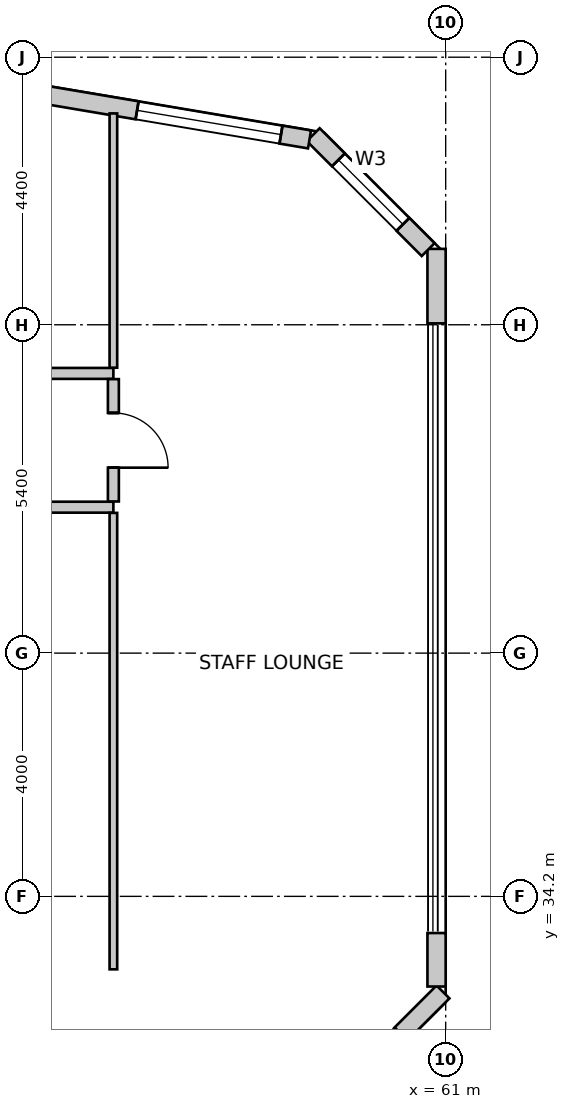
"""IFC4 building model, lengths in metres.
Left out: names, types, materials, properties, quantities, classifications, styles, units other than length and angle.
Written with IfcOpenShell. Run it as: python <this file> out.ifc"""

import sys

from ifc_helpers import new_model, si_unit, direction, frame, frame_2d, origin, place, context, subcontext, project, spatial, rectangle, extrude, source, transform, mapped, element, fill, save


model = new_model("IFC4")
c1 = context("Model", 3, precision=1e-05, world=origin(), true_north=direction((0.0, 1.0)))
c2 = subcontext(c1, "Body", "Model", "MODEL_VIEW")
j1 = project(units=[si_unit("LENGTHUNIT", "METRE"), si_unit("PLANEANGLEUNIT", "RADIAN")], contexts=[c1])
p1 = place(None, origin())
s1 = spatial("IfcSite", under=j1, at=p1, CompositionType="ELEMENT")
p2 = place(p1, origin())
s2 = spatial("IfcBuilding", under=s1, at=p2, CompositionType="ELEMENT")
p3 = place(p2, frame((0.0, 0.0, 43.0)))
s3 = spatial("IfcBuildingStorey", under=s2, at=p3, CompositionType="ELEMENT", Elevation=43.0)
p4 = place(p3, frame((57.876, 29.548, 0.0), z_axis=(0.0, 0.0, 1.0), x_axis=(0.707106781187, 0.707106781187, 0.0)))
e1 = element("IfcWall", 1, at=p4, inside=s3, PredefinedType="SOLIDWALL", context=c2, shape_type="SweptSolid", body=[
    extrude(rectangle(XDim=4.356, YDim=0.3, at=frame_2d((2.178, 0.0))), origin(), (0.0, 0.0, 1.0), 3.75),
])
m1 = source(origin(), c2, "Body", "SweptSolid", [
    extrude(rectangle(XDim=2.4, YDim=2.2, at=frame_2d((1.2, 1.1))), frame((0.0, 0.16, 0.0), z_axis=(0.0, -1.0, 0.0), x_axis=(1.0, 0.0, 0.0)), (0.0, 0.0, 1.0), 0.32),
])
p5 = place(p4, frame((0.978, 0.0, 0.85)))
e2 = element("IfcOpeningElement", 2, at=p5, cuts=e1, PredefinedType="OPENING", context=c2, shape_type="MappedRepresentation", body=[
    mapped(m1, transform((0.0, 0.0, 0.0), scale=1.0)),
])
p6 = place(p3, frame((60.85, 32.717, 0.0), z_axis=(0.0, 0.0, 1.0), x_axis=(0.0, 1.0, 0.0)))
e3 = element("IfcWall", 3, at=p6, inside=s3, PredefinedType="SOLIDWALL", context=c2, shape_type="SweptSolid", body=[
    extrude(rectangle(XDim=0.88, YDim=0.3, at=frame_2d((0.44, 0.0))), origin(), (0.0, 0.0, 1.0), 3.75),
])
p7 = place(p3, frame((60.85, 43.623, 0.0), z_axis=(0.0, 0.0, 1.0), x_axis=(0.0, 1.0, 0.0)))
e4 = element("IfcWall", 4, at=p7, inside=s3, PredefinedType="SOLIDWALL", context=c2, shape_type="SweptSolid", body=[
    extrude(rectangle(XDim=1.225, YDim=0.3, at=frame_2d((0.613, 0.0))), origin(), (0.0, 0.0, 1.0), 3.75),
])
p8 = place(p3, frame((60.712, 44.836, 0.0), z_axis=(0.0, 0.0, 1.0), x_axis=(-0.707106781187, 0.707106781187, 0.0)))
e5 = element("IfcWall", 5, at=p8, inside=s3, PredefinedType="SOLIDWALL", context=c2, shape_type="SweptSolid", body=[
    extrude(rectangle(XDim=2.673, YDim=0.3, at=frame_2d((1.336, 0.0))), origin(), (0.0, 0.0, 1.0), 3.75),
])
m2 = source(origin(), c2, "Body", "SweptSolid", [
    extrude(rectangle(XDim=1.5, YDim=1.8, at=frame_2d((0.75, 0.9))), frame((0.0, 0.16, 0.0), z_axis=(0.0, -1.0, 0.0), x_axis=(1.0, 0.0, 0.0)), (0.0, 0.0, 1.0), 0.32),
])
p9 = place(p8, frame((0.587, 0.0, 0.85)))
e6 = element("IfcOpeningElement", 6, at=p9, cuts=e5, PredefinedType="OPENING", context=c2, shape_type="MappedRepresentation", body=[
    mapped(m2, transform((0.0, 0.0, 0.0), scale=1.0)),
])
p10 = place(p3, frame((58.761, 46.648, 0.0), z_axis=(0.0, 0.0, 1.0), x_axis=(-0.98607502735, 0.166301053624, 0.0)))
e7 = element("IfcWall", 7, at=p10, inside=s3, PredefinedType="SOLIDWALL", context=c2, shape_type="SweptSolid", body=[
    extrude(rectangle(XDim=37.397, YDim=0.3, at=frame_2d((18.699, 0.0))), origin(), (0.0, 0.0, 1.0), 3.75),
])
p11 = place(p10, frame((0.476, 0.0, 0.85)))
e8 = element("IfcOpeningElement", 8, at=p11, cuts=e7, PredefinedType="OPENING", context=c2, shape_type="MappedRepresentation", body=[
    mapped(m1, transform((0.0, 0.0, 0.0), scale=1.0)),
])
m3 = source(origin(), c2, "Body", "SweptSolid", [
    extrude(rectangle(XDim=2.8, YDim=2.4, at=frame_2d((1.4, 1.2))), frame((0.0, 0.16, 0.0), z_axis=(0.0, -1.0, 0.0), x_axis=(1.0, 0.0, 0.0)), (0.0, 0.0, 1.0), 0.32),
])
p12 = place(p10, frame((4.371, 0.0, 0.85)))
e9 = element("IfcOpeningElement", 9, at=p12, cuts=e7, PredefinedType="OPENING", context=c2, shape_type="MappedRepresentation", body=[
    mapped(m3, transform((0.0, 0.0, 0.0), scale=1.0)),
])
p13 = place(p10, frame((9.169, 0.0, 0.85)))
e10 = element("IfcOpeningElement", 10, at=p13, cuts=e7, PredefinedType="OPENING", context=c2, shape_type="MappedRepresentation", body=[
    mapped(m1, transform((0.0, 0.0, 0.0), scale=1.0)),
])
p14 = place(p10, frame((13.566, 0.0, 0.85)))
e11 = element("IfcOpeningElement", 11, at=p14, cuts=e7, PredefinedType="OPENING", context=c2, shape_type="MappedRepresentation", body=[
    mapped(m3, transform((0.0, 0.0, 0.0), scale=1.0)),
])
p15 = place(p10, frame((18.899, 0.0, 0.85)))
e12 = element("IfcOpeningElement", 12, at=p15, cuts=e7, PredefinedType="OPENING", context=c2, shape_type="MappedRepresentation", body=[
    mapped(m3, transform((0.0, 0.0, 0.0), scale=1.0)),
])
p16 = place(p10, frame((24.286, 0.0, 0.85)))
e13 = element("IfcOpeningElement", 13, at=p16, cuts=e7, PredefinedType="OPENING", context=c2, shape_type="MappedRepresentation", body=[
    mapped(m1, transform((0.0, 0.0, 0.0), scale=1.0)),
])
p17 = place(p10, frame((29.757, 0.0, 0.85)))
e14 = element("IfcOpeningElement", 14, at=p17, cuts=e7, PredefinedType="OPENING", context=c2, shape_type="MappedRepresentation", body=[
    mapped(m3, transform((0.0, 0.0, 0.0), scale=1.0)),
])
p18 = place(p10, frame((34.256, 0.0, 0.85)))
e15 = element("IfcOpeningElement", 15, at=p18, cuts=e7, PredefinedType="OPENING", context=c2, shape_type="MappedRepresentation", body=[
    mapped(m3, transform((0.0, 0.0, 0.0), scale=1.0)),
])
p19 = place(p3, frame((55.535, 40.6, 0.0), z_axis=(0.0, 0.0, 1.0), x_axis=(-1.0, 0.0, 0.0)))
e16 = element("IfcWall", 16, at=p19, inside=s3, PredefinedType="PARTITIONING", context=c2, shape_type="SweptSolid", body=[
    extrude(rectangle(XDim=10.706, YDim=0.18, at=frame_2d((5.353, 0.0))), origin(), (0.0, 0.0, 1.0), 3.125),
])
m4 = source(origin(), c2, "Body", "SweptSolid", [
    extrude(rectangle(XDim=0.9, YDim=2.15, at=frame_2d((0.45, 1.075))), frame((0.0, 0.1, 0.0), z_axis=(0.0, -1.0, 0.0), x_axis=(1.0, 0.0, 0.0)), (0.0, 0.0, 1.0), 0.2),
])
p20 = place(p19, frame((4.843, 0.0, 0.0)))
e17 = element("IfcOpeningElement", 17, at=p20, cuts=e16, PredefinedType="OPENING", context=c2, shape_type="MappedRepresentation", body=[
    mapped(m4, transform((0.0, 0.0, 0.0), scale=1.0)),
])
p21 = place(p3, frame((41.662, 42.8, 0.0), z_axis=(0.0, 0.0, 1.0), x_axis=(1.0, 0.0, 0.0)))
e18 = element("IfcWall", 18, at=p21, inside=s3, PredefinedType="PARTITIONING", context=c2, shape_type="SweptSolid", body=[
    extrude(rectangle(XDim=13.873, YDim=0.18, at=frame_2d((6.937, 0.0))), origin(), (0.0, 0.0, 1.0), 3.125),
])
p22 = place(p21, frame((6.426, 0.0, 0.0)))
e19 = element("IfcOpeningElement", 19, at=p22, cuts=e18, PredefinedType="OPENING", context=c2, shape_type="MappedRepresentation", body=[
    mapped(m4, transform((0.0, 0.0, 0.0), scale=1.0)),
])
p23 = place(p3, frame((55.535, 42.706, 0.0), z_axis=(0.0, 0.0, 1.0), x_axis=(0.0, -1.0, 0.0)))
e20 = element("IfcWall", 20, at=p23, inside=s3, PredefinedType="PARTITIONING", context=c2, shape_type="SweptSolid", body=[
    extrude(rectangle(XDim=2.012, YDim=0.18, at=frame_2d((1.006, 0.0))), origin(), (0.0, 0.0, 1.0), 3.75),
])
p24 = place(p23, frame((0.556, 0.0, 0.0)))
e21 = element("IfcOpeningElement", 21, at=p24, cuts=e20, PredefinedType="OPENING", context=c2, shape_type="MappedRepresentation", body=[
    mapped(m4, transform((0.0, 0.0, 0.0), scale=1.0)),
])
p25 = place(p3, frame((55.535, 40.506, 0.0), z_axis=(0.0, 0.0, 1.0), x_axis=(0.0, -1.0, 0.0)))
e22 = element("IfcWall", 22, at=p25, inside=s3, PredefinedType="PARTITIONING", context=c2, shape_type="SweptSolid", body=[
    extrude(rectangle(XDim=7.506, YDim=0.125, at=frame_2d((3.753, 0.0))), origin(), (0.0, 0.0, 1.0), 3.75),
])
p26 = place(p3, frame((55.535, 47.076, 0.0), z_axis=(0.0, 0.0, 1.0), x_axis=(0.0, -1.0, 0.0)))
e23 = element("IfcWall", 23, at=p26, inside=s3, PredefinedType="PARTITIONING", context=c2, shape_type="SweptSolid", body=[
    extrude(rectangle(XDim=4.182, YDim=0.125, at=frame_2d((2.091, 0.0))), origin(), (0.0, 0.0, 1.0), 3.75),
])
m5 = source(origin(), c2, "Body", "SweptSolid", [
    extrude(rectangle(XDim=1.5, YDim=1.8, at=frame_2d((0.75, 0.9))), frame((0.0, -0.015, 0.0), z_axis=(0.0, -1.0, 0.0), x_axis=(1.0, 0.0, 0.0)), (0.0, 0.0, 1.0), 0.06),
])
p27 = place(p9, origin())
e24 = element("IfcWindow", 24, at=p27, inside=s3, PartitioningType="SINGLE_PANEL", PredefinedType="WINDOW", context=c2, shape_type="MappedRepresentation", body=[
    mapped(m5, transform((0.0, 0.0, 0.0), scale=1.0)),
])
fill(e6, e24)
m6 = source(origin(), c2, "Body", "SweptSolid", [
    extrude(rectangle(XDim=2.4, YDim=2.2, at=frame_2d((1.2, 1.1))), frame((0.0, -0.015, 0.0), z_axis=(0.0, -1.0, 0.0), x_axis=(1.0, 0.0, 0.0)), (0.0, 0.0, 1.0), 0.06),
])
p28 = place(p11, origin())
e25 = element("IfcWindow", 25, at=p28, inside=s3, PartitioningType="SINGLE_PANEL", PredefinedType="WINDOW", context=c2, shape_type="MappedRepresentation", body=[
    mapped(m6, transform((0.0, 0.0, 0.0), scale=1.0)),
])
fill(e8, e25)
m7 = source(origin(), c2, "Body", "SweptSolid", [
    extrude(rectangle(XDim=0.9, YDim=2.15, at=frame_2d((0.45, 1.075))), frame((0.0, 0.025, 0.0), z_axis=(0.0, -1.0, 0.0), x_axis=(1.0, 0.0, 0.0)), (0.0, 0.0, 1.0), 0.05),
])
p29 = place(p24, origin())
e26 = element("IfcDoor", 26, at=p29, inside=s3, OperationType="SINGLE_SWING_RIGHT", PredefinedType="DOOR", context=c2, shape_type="MappedRepresentation", body=[
    mapped(m7, transform((0.0, 0.0, 0.0), scale=1.0)),
])
fill(e21, e26)
save(model, sys.argv[1])
